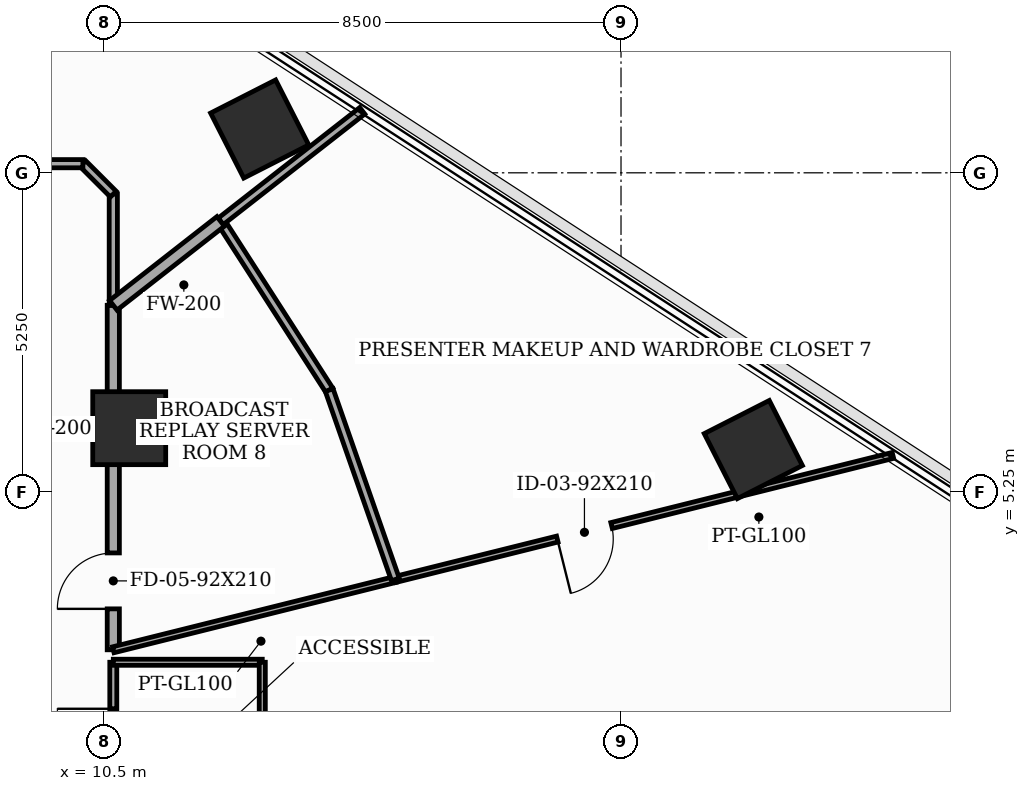
"""IFC4 building model, lengths in metres.
Left out: names, types, materials, properties, quantities, classifications, styles, units other than length and angle.
Written with IfcOpenShell. Run it as: python <this file> out.ifc"""

import sys

from ifc_helpers import new_model, si_unit, direction, frame, frame_2d, origin, origin_2d, place, context, subcontext, project, spatial, rectangle, extrude, element, fill, save


model = new_model("IFC4")
c1 = context("Model", 3, precision=1e-05, world=origin(), true_north=direction((0.0, 1.0)))
c2 = subcontext(c1, "Body", "Model", "MODEL_VIEW")
j1 = project(units=[si_unit("LENGTHUNIT", "METRE"), si_unit("PLANEANGLEUNIT", "RADIAN")], contexts=[c1])
p1 = place(None, origin())
s1 = spatial("IfcSite", under=j1, at=p1, CompositionType="ELEMENT")
p2 = place(p1, origin())
s2 = spatial("IfcBuilding", under=s1, at=p2, CompositionType="ELEMENT")
p3 = place(p2, frame((0.0, 0.0, 119.9)))
s3 = spatial("IfcBuildingStorey", under=s2, at=p3, CompositionType="ELEMENT", Elevation=119.9)
for number, where, z_axis, x_axis in (
    (1, (10.912, 6.3, 0.0), (0.0, 0.0, 1.0), (1.0, 0.0, 0.0)),
    (2, (21.176, 5.948, 0.0), (0.0, 0.0, 1.0), (0.891, 0.454, 0.0)),
    (3, (13.058, 11.22, 0.0), (0.0, 0.0, 1.0), (0.891, 0.454, 0.0)),
):
    element("IfcColumn", number, at=place(p3, frame(where, z_axis=z_axis, x_axis=x_axis)), inside=s3, PredefinedType="COLUMN", context=c2, shape_type="SweptSolid", body=[
        extrude(rectangle(XDim=1.2, YDim=1.2, at=origin_2d()), origin(), (0.0, 0.0, 1.0), 3.7),
    ])
p4 = place(p3, frame((10.65, 0.0, 0.0), z_axis=(0.0, 0.0, 1.0), x_axis=(0.0, 1.0, 0.0)))
e4 = element("IfcWall", 4, at=p4, inside=s3, PredefinedType="PARTITIONING", context=c2, shape_type="SweptSolid", body=[
    extrude(rectangle(XDim=2.45, YDim=0.115, at=frame_2d((1.225, 0.0))), origin(), (0.0, 0.0, 1.0), 2.785),
])
p5 = place(p4, frame((0.765, 0.0, 0.0)))
e5 = element("IfcOpeningElement", 5, at=p5, cuts=e4, PredefinedType="OPENING", context=c2, shape_type="SweptSolid", body=[
    extrude(rectangle(XDim=0.92, YDim=2.1, at=frame_2d((0.46, 1.05))), frame((0.0, 0.067, 0.0), z_axis=(0.0, -1.0, 0.0), x_axis=(1.0, 0.0, 0.0)), (0.0, 0.0, 1.0), 0.135),
])
p6 = place(p3, frame((10.65, 2.655, 0.0), z_axis=(0.0, 0.0, 1.0), x_axis=(0.0, 1.0, 0.0)))
e6 = element("IfcWall", 6, at=p6, inside=s3, PredefinedType="SOLIDWALL", context=c2, shape_type="SweptSolid", body=[
    extrude(rectangle(XDim=5.666, YDim=0.2, at=frame_2d((2.833, 0.0))), origin(), (0.0, 0.0, 1.0), 2.785),
])
p7 = place(p6, frame((0.673, 0.0, 0.0)))
e7 = element("IfcOpeningElement", 7, at=p7, cuts=e6, PredefinedType="OPENING", context=c2, shape_type="SweptSolid", body=[
    extrude(rectangle(XDim=0.92, YDim=2.1, at=frame_2d((0.46, 1.05))), frame((0.0, 0.11, 0.0), z_axis=(0.0, -1.0, 0.0), x_axis=(1.0, 0.0, 0.0)), (0.0, 0.0, 1.0), 0.22),
])
p8 = place(p3, frame((10.65, 8.321, 0.0), z_axis=(0.0, 0.0, 1.0), x_axis=(0.0, 1.0, 0.0)))
e8 = element("IfcWall", 8, at=p8, inside=s3, PredefinedType="PARTITIONING", context=c2, shape_type="SweptSolid", body=[
    extrude(rectangle(XDim=1.829, YDim=0.135, at=frame_2d((0.915, 0.0))), origin(), (0.0, 0.0, 1.0), 3.125),
])
p9 = place(p3, frame((10.65, 10.15, 0.0), z_axis=(0.0, 0.0, 1.0), x_axis=(-0.707106781187, 0.707106781187, 0.0)))
e9 = element("IfcWall", 9, at=p9, inside=s3, PredefinedType="PARTITIONING", context=c2, shape_type="SweptSolid", body=[
    extrude(rectangle(XDim=0.707, YDim=0.135, at=frame_2d((0.354, 0.0))), origin(), (0.0, 0.0, 1.0), 3.125),
])
p10 = place(p3, frame((10.15, 10.65, 0.0), z_axis=(0.0, 0.0, 1.0), x_axis=(-1.0, 0.0, 0.0)))
e10 = element("IfcWall", 10, at=p10, inside=s3, PredefinedType="PARTITIONING", context=c2, shape_type="SweptSolid", body=[
    extrude(rectangle(XDim=12.414, YDim=0.135, at=frame_2d((6.207, 0.0))), origin(), (0.0, 0.0, 1.0), 2.785),
])
p11 = place(p10, frame((7.222, 0.0, 0.0)))
e11 = element("IfcOpeningElement", 11, at=p11, cuts=e10, PredefinedType="OPENING", context=c2, shape_type="SweptSolid", body=[
    extrude(rectangle(XDim=0.95, YDim=2.1, at=frame_2d((0.475, 1.05))), frame((0.0, 0.077, 0.0), z_axis=(0.0, -1.0, 0.0), x_axis=(1.0, 0.0, 0.0)), (0.0, 0.0, 1.0), 0.155),
])
p12 = place(p3, frame((10.65, 2.45, 0.0), z_axis=(0.0, 0.0, 1.0), x_axis=(1.0, 0.0, 0.0)))
e12 = element("IfcWall", 12, at=p12, inside=s3, PredefinedType="MOVABLE", context=c2, shape_type="SweptSolid", body=[
    extrude(rectangle(XDim=2.45, YDim=0.1, at=frame_2d((1.225, 0.0))), origin(), (0.0, 0.0, 1.0), 2.785),
])
p13 = place(p3, frame((13.1, 2.45, 0.0), z_axis=(0.0, 0.0, 1.0), x_axis=(0.0, -1.0, 0.0)))
e13 = element("IfcWall", 13, at=p13, inside=s3, PredefinedType="MOVABLE", context=c2, shape_type="SweptSolid", body=[
    extrude(rectangle(XDim=2.45, YDim=0.1, at=frame_2d((1.225, 0.0))), origin(), (0.0, 0.0, 1.0), 3.5),
])
p14 = place(p3, frame((23.472, 5.852, 0.0), z_axis=(0.0, 0.0, 1.0), x_axis=(-0.970293868859, -0.24192934517, 0.0)))
e14 = element("IfcWall", 14, at=p14, inside=s3, PredefinedType="MOVABLE", context=c2, shape_type="SweptSolid", body=[
    extrude(rectangle(XDim=8.433, YDim=0.1, at=frame_2d((4.217, 0.0))), origin(), (0.0, 0.0, 1.0), 2.985),
])
p15 = place(p14, frame((4.769, 0.0, 0.0)))
e15 = element("IfcOpeningElement", 15, at=p15, cuts=e14, PredefinedType="OPENING", context=c2, shape_type="SweptSolid", body=[
    extrude(rectangle(XDim=0.92, YDim=2.1, at=frame_2d((0.46, 1.05))), frame((0.0, 0.06, 0.0), z_axis=(0.0, -1.0, 0.0), x_axis=(1.0, 0.0, 0.0)), (0.0, 0.0, 1.0), 0.12),
])
p16 = place(p3, frame((15.289, 3.812, 0.0), z_axis=(0.0, 0.0, 1.0), x_axis=(-0.970280510542, -0.241982914402, 0.0)))
e16 = element("IfcWall", 16, at=p16, inside=s3, PredefinedType="MOVABLE", context=c2, shape_type="SweptSolid", body=[
    extrude(rectangle(XDim=4.781, YDim=0.1, at=frame_2d((2.391, 0.0))), origin(), (0.0, 0.0, 1.0), 2.785),
])
p17 = place(p3, frame((12.416, 9.701, 0.0), z_axis=(0.0, 0.0, 1.0), x_axis=(0.540981963117, -0.841034194062, 0.0)))
e17 = element("IfcWall", 17, at=p17, inside=s3, PredefinedType="PARTITIONING", context=c2, shape_type="SweptSolid", body=[
    extrude(rectangle(XDim=3.299, YDim=0.135, at=frame_2d((1.65, 0.0))), origin(), (0.0, 0.0, 1.0), 2.885),
])
p18 = place(p3, frame((14.201, 6.926, 0.0), z_axis=(0.0, 0.0, 1.0), x_axis=(0.329872352593, -0.944025545732, 0.0)))
e18 = element("IfcWall", 18, at=p18, inside=s3, PredefinedType="PARTITIONING", context=c2, shape_type="SweptSolid", body=[
    extrude(rectangle(XDim=3.299, YDim=0.135, at=frame_2d((1.649, 0.0))), origin(), (0.0, 0.0, 1.0), 2.885),
])
p19 = place(p3, frame((14.744, 11.52, 0.0), z_axis=(0.0, 0.0, 1.0), x_axis=(-0.788015604839, -0.615655265981, 0.0)))
e19 = element("IfcWall", 19, at=p19, inside=s3, PredefinedType="PARTITIONING", context=c2, shape_type="SweptSolid", body=[
    extrude(rectangle(XDim=2.955, YDim=0.135, at=frame_2d((1.478, 0.0))), origin(), (0.0, 0.0, 1.0), 2.885),
])
p20 = place(p3, frame((12.416, 9.701, 0.0), z_axis=(0.0, 0.0, 1.0), x_axis=(-0.788001252745, -0.615673635681, 0.0)))
e20 = element("IfcWall", 20, at=p20, inside=s3, PredefinedType="SOLIDWALL", context=c2, shape_type="SweptSolid", body=[
    extrude(rectangle(XDim=2.241, YDim=0.2, at=frame_2d((1.121, 0.0))), origin(), (0.0, 0.0, 1.0), 2.885),
])
p21 = place(p5, origin())
e21 = element("IfcDoor", 21, at=p21, inside=s3, OperationType="SINGLE_SWING_RIGHT", PredefinedType="DOOR", context=c2, shape_type="SweptSolid", body=[
    extrude(rectangle(XDim=0.92, YDim=2.1, at=frame_2d((0.46, 1.05))), frame((0.0, 0.025, 0.0), z_axis=(0.0, -1.0, 0.0), x_axis=(1.0, 0.0, 0.0)), (0.0, 0.0, 1.0), 0.05),
])
fill(e5, e21)
p22 = place(p7, origin())
e22 = element("IfcDoor", 22, at=p22, inside=s3, OperationType="SINGLE_SWING_LEFT", PredefinedType="DOOR", context=c2, shape_type="SweptSolid", body=[
    extrude(rectangle(XDim=0.92, YDim=2.1, at=frame_2d((0.46, 1.05))), frame((0.0, 0.025, 0.0), z_axis=(0.0, -1.0, 0.0), x_axis=(1.0, 0.0, 0.0)), (0.0, 0.0, 1.0), 0.05),
])
fill(e7, e22)
p23 = place(p15, origin())
e23 = element("IfcDoor", 23, at=p23, inside=s3, OperationType="SINGLE_SWING_RIGHT", PredefinedType="DOOR", context=c2, shape_type="SweptSolid", body=[
    extrude(rectangle(XDim=0.92, YDim=2.1, at=frame_2d((0.46, 1.05))), frame((0.0, 0.025, 0.0), z_axis=(0.0, -1.0, 0.0), x_axis=(1.0, 0.0, 0.0)), (0.0, 0.0, 1.0), 0.05),
])
fill(e15, e23)
save(model, sys.argv[1])
